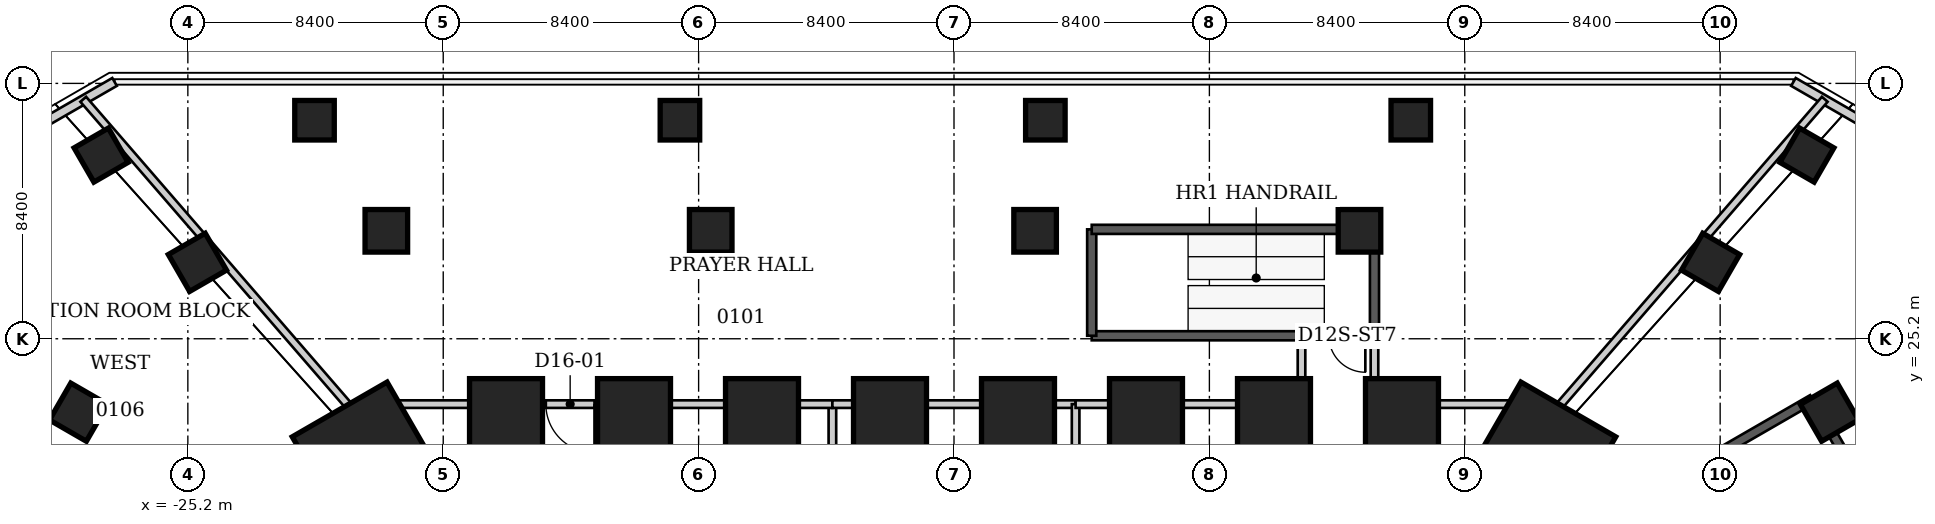
"""IFC4 building model, lengths in metres.
Left out: names, types, materials, properties, quantities, classifications, styles, units other than length and angle.
Written with IfcOpenShell. Run it as: python <this file> out.ifc"""

import sys

from ifc_helpers import new_model, si_unit, direction, frame, frame_2d, origin, origin_2d, place, context, subcontext, project, spatial, rectangle, extrude, element, fill, save


model = new_model("IFC4")
c1 = context("Model", 3, precision=1e-05, world=origin(), true_north=direction((0.0, 1.0)))
c2 = subcontext(c1, "Body", "Model", "MODEL_VIEW")
j1 = project(units=[si_unit("LENGTHUNIT", "METRE"), si_unit("PLANEANGLEUNIT", "RADIAN")], contexts=[c1])
p1 = place(None, origin())
s1 = spatial("IfcSite", under=j1, at=p1, CompositionType="ELEMENT")
p2 = place(p1, origin())
s2 = spatial("IfcBuilding", under=s1, at=p2, CompositionType="ELEMENT")
p3 = place(p2, frame((0.0, 0.0, 6.0)))
s3 = spatial("IfcBuildingStorey", under=s2, at=p3, CompositionType="ELEMENT", Elevation=6.0)
for number, where, z_axis, x_axis in (
    (1, (-14.735, 22.689, 0.0), (0.0, 0.0, 1.0), (0.0, 1.0, 0.0)),
    (2, (-10.525, 22.689, 0.0), (0.0, 0.0, 1.0), (0.0, 1.0, 0.0)),
    (3, (-6.315, 22.689, 0.0), (0.0, 0.0, 1.0), (0.0, 1.0, 0.0)),
    (4, (-2.105, 22.689, 0.0), (0.0, 0.0, 1.0), (0.0, 1.0, 0.0)),
    (5, (2.105, 22.689, 0.0), (0.0, 0.0, 1.0), (0.0, 1.0, 0.0)),
    (6, (6.315, 22.689, 0.0), (0.0, 0.0, 1.0), (0.0, 1.0, 0.0)),
    (7, (10.525, 22.689, 0.0), (0.0, 0.0, 1.0), (0.0, 1.0, 0.0)),
    (8, (14.735, 22.689, 0.0), (0.0, 0.0, 1.0), (0.0, 1.0, 0.0)),
):
    element("IfcColumn", number, at=place(p3, frame(where, z_axis=z_axis, x_axis=x_axis)), inside=s3, PredefinedType="COLUMN", context=c2, shape_type="SweptSolid", body=[
        extrude(rectangle(XDim=2.4, YDim=2.4, at=origin_2d()), origin(), (0.0, 0.0, 1.0), 6.0),
    ])
for number, where, z_axis, x_axis in (
    (9, (19.606, 21.835, 0.0), (0.0, 0.0, 1.0), (0.5, 0.866, 0.0)),
    (10, (-19.606, 21.835, 0.0), (0.0, 0.0, 1.0), (-0.5, 0.866, 0.0)),
):
    element("IfcColumn", number, at=place(p3, frame(where, z_axis=z_axis, x_axis=x_axis)), inside=s3, PredefinedType="COLUMN", context=c2, shape_type="SweptSolid", body=[
        extrude(rectangle(XDim=2.4, YDim=3.6, at=origin_2d()), origin(), (0.0, 0.0, 1.0), 6.0),
    ])
for number, where, z_axis, x_axis in (
    (11, (-18.672, 28.751, 0.0), (0.0, 0.0, 1.0), (0.0, 1.0, 0.0)),
    (12, (-8.002, 28.751, 0.0), (0.0, 0.0, 1.0), (0.0, 1.0, 0.0)),
    (13, (2.667, 28.751, 0.0), (0.0, 0.0, 1.0), (0.0, 1.0, 0.0)),
    (14, (13.337, 28.751, 0.0), (0.0, 0.0, 1.0), (0.0, 1.0, 0.0)),
    (15, (24.885, 27.714, 0.0), (0.0, 0.0, 1.0), (0.5, 0.866, 0.0)),
    (16, (28.794, 22.785, 0.0), (0.0, 0.0, 1.0), (0.866, 0.5, 0.0)),
    (17, (-28.794, 22.785, 0.0), (0.0, 0.0, 1.0), (-0.866, 0.5, 0.0)),
    (18, (-24.885, 27.714, 0.0), (0.0, 0.0, 1.0), (-0.5, 0.866, 0.0)),
):
    element("IfcColumn", number, at=place(p3, frame(where, z_axis=z_axis, x_axis=x_axis)), inside=s3, PredefinedType="COLUMN", context=c2, shape_type="SweptSolid", body=[
        extrude(rectangle(XDim=1.4, YDim=1.4, at=origin_2d()), origin(), (0.0, 0.0, 1.0), 6.0),
    ])
for number, where, z_axis, x_axis in (
    (19, (-21.034, 32.388, 0.0), (0.0, 0.0, 1.0), (0.0, 1.0, 0.0)),
    (20, (-9.014, 32.388, 0.0), (0.0, 0.0, 1.0), (0.0, 1.0, 0.0)),
    (21, (3.005, 32.388, 0.0), (0.0, 0.0, 1.0), (0.0, 1.0, 0.0)),
    (22, (15.024, 32.388, 0.0), (0.0, 0.0, 1.0), (0.0, 1.0, 0.0)),
    (23, (28.052, 31.241, 0.0), (0.0, 0.0, 1.0), (0.5, 0.866, 0.0)),
    (24, (-28.052, 31.241, 0.0), (0.0, 0.0, 1.0), (-0.5, 0.866, 0.0)),
):
    element("IfcColumn", number, at=place(p3, frame(where, z_axis=z_axis, x_axis=x_axis)), inside=s3, PredefinedType="COLUMN", context=c2, shape_type="SweptSolid", body=[
        extrude(rectangle(XDim=1.3, YDim=1.3, at=origin_2d()), origin(), (0.0, 0.0, 1.0), 6.0),
    ])
for number, where, z_axis, x_axis in (
    (25, (27.61, 33.648, 0.0), (0.0, 0.0, 1.0), (0.866, -0.5, 0.0)),
    (26, (-30.035, 32.248, 0.0), (0.0, 0.0, 1.0), (0.866, 0.5, 0.0)),
):
    element("IfcWall", number, at=place(p3, frame(where, z_axis=z_axis, x_axis=x_axis)), inside=s3, PredefinedType="SOLIDWALL", context=c2, shape_type="SweptSolid", body=[
        extrude(rectangle(XDim=2.8, YDim=0.3, at=frame_2d((1.4, 0.0))), origin(), (0.0, 0.0, 1.0), 5.84),
    ])
p4 = place(p3, frame((-20.88, 22.05, 0.0), z_axis=(0.0, 0.0, 1.0), x_axis=(-0.50097690648, -0.86546065143, 0.0)))
e27 = element("IfcWall", 27, at=p4, inside=s3, PredefinedType="PARTITIONING", context=c2, shape_type="SweptSolid", body=[
    extrude(rectangle(XDim=5.35, YDim=0.25, at=frame_2d((2.675, 0.0))), origin(), (0.0, 0.0, 1.0), 4.04),
])
p5 = place(p3, frame((-20.23, 22.43, 0.0), z_axis=(0.0, 0.0, 1.0), x_axis=(-0.863331575042, -0.504637088942, 0.0)))
e28 = element("IfcWall", 28, at=p5, inside=s3, PredefinedType="PARTITIONING", context=c2, shape_type="SweptSolid", body=[
    extrude(rectangle(XDim=0.753, YDim=0.25, at=frame_2d((0.376, 0.0))), origin(), (0.0, 0.0, 1.0), 5.84),
])
p6 = place(p3, frame((-19.746, 22.708, 0.0), z_axis=(0.0, 0.0, 1.0), x_axis=(-0.867257505244, -0.49785983931, 0.0)))
e29 = element("IfcWall", 29, at=p6, inside=s3, PredefinedType="PARTITIONING", context=c2, shape_type="SweptSolid", body=[
    extrude(rectangle(XDim=0.443, YDim=0.25, at=frame_2d((0.221, 0.0))), origin(), (0.0, 0.0, 1.0), 5.84),
])
p7 = place(p3, frame((-19.69, 22.74, 0.0), z_axis=(0.0, 0.0, 1.0), x_axis=(-0.654569518712, 0.756001815589, 0.0)))
e30 = element("IfcWall", 30, at=p7, inside=s3, PredefinedType="PARTITIONING", context=c2, shape_type="SweptSolid", body=[
    extrude(rectangle(XDim=13.674, YDim=0.25, at=frame_2d((6.837, 0.0))), origin(), (0.0, 0.0, 1.0), 5.75),
])
p8 = place(p3, frame((-19.15, 23.05, 0.0), z_axis=(0.0, 0.0, 1.0), x_axis=(-0.867193315, -0.497971640175, 0.0)))
e31 = element("IfcWall", 31, at=p8, inside=s3, PredefinedType="PARTITIONING", context=c2, shape_type="SweptSolid", body=[
    extrude(rectangle(XDim=0.588, YDim=0.25, at=frame_2d((0.294, 0.0))), origin(), (0.0, 0.0, 1.0), 5.84),
])
p9 = place(p3, frame((-17.14, 20.65, 0.0), z_axis=(0.0, 0.0, 1.0), x_axis=(-0.866514787199, 0.49915140345, 0.0)))
e32 = element("IfcWall", 32, at=p9, inside=s3, PredefinedType="PARTITIONING", context=c2, shape_type="SweptSolid", body=[
    extrude(rectangle(XDim=3.566, YDim=0.25, at=frame_2d((1.783, 0.0))), origin(), (0.0, 0.0, 1.0), 5.84),
])
p10 = place(p3, frame((-4.0, 10.04, 0.0), z_axis=(0.0, 0.0, 1.0), x_axis=(0.0, 1.0, 0.0)))
e33 = element("IfcWall", 33, at=p10, inside=s3, PredefinedType="PARTITIONING", context=c2, shape_type="SweptSolid", body=[
    extrude(rectangle(XDim=13.01, YDim=0.25, at=frame_2d((6.505, 0.0))), origin(), (0.0, 0.0, 1.0), 5.84),
])
p11 = place(p3, frame((-4.0, 23.05, 0.0), z_axis=(0.0, 0.0, 1.0), x_axis=(-1.0, 0.0, 0.0)))
e34 = element("IfcWall", 34, at=p11, inside=s3, PredefinedType="PARTITIONING", context=c2, shape_type="SweptSolid", body=[
    extrude(rectangle(XDim=15.15, YDim=0.25, at=frame_2d((7.575, 0.0))), origin(), (0.0, 0.0, 1.0), 4.04),
])
p12 = place(p11, frame((7.825, 0.0, 0.0)))
e35 = element("IfcOpeningElement", 35, at=p12, cuts=e34, PredefinedType="OPENING", context=c2, shape_type="SweptSolid", body=[
    extrude(rectangle(XDim=1.6, YDim=2.4, at=frame_2d((0.8, 1.2))), frame((0.0, 0.125, 0.0), z_axis=(0.0, -1.0, 0.0), x_axis=(1.0, 0.0, 0.0)), (0.0, 0.0, 1.0), 0.25),
])
p13 = place(p3, frame((4.0, 23.05, 0.0), z_axis=(0.0, 0.0, 1.0), x_axis=(-1.0, 0.0, 0.0)))
e36 = element("IfcWall", 36, at=p13, inside=s3, PredefinedType="PARTITIONING", context=c2, shape_type="SweptSolid", body=[
    extrude(rectangle(XDim=8.0, YDim=0.25, at=frame_2d((4.0, 0.0))), origin(), (0.0, 0.0, 1.0), 4.04),
])
p14 = place(p3, frame((4.0, 23.05, 0.0), z_axis=(0.0, 0.0, 1.0), x_axis=(0.0, -1.0, 0.0)))
e37 = element("IfcWall", 37, at=p14, inside=s3, PredefinedType="PARTITIONING", context=c2, shape_type="SweptSolid", body=[
    extrude(rectangle(XDim=13.03, YDim=0.25, at=frame_2d((6.515, 0.0))), origin(), (0.0, 0.0, 1.0), 5.84),
])
p15 = place(p14, frame((5.965, 0.0, 0.0)))
e38 = element("IfcOpeningElement", 38, at=p15, cuts=e37, PredefinedType="OPENING", context=c2, shape_type="SweptSolid", body=[
    extrude(rectangle(XDim=1.1, YDim=2.2, at=frame_2d((0.55, 1.1))), frame((0.0, 0.125, 0.0), z_axis=(0.0, -1.0, 0.0), x_axis=(1.0, 0.0, 0.0)), (0.0, 0.0, 1.0), 0.25),
])
p16 = place(p3, frame((5.43, 23.05, 0.0), z_axis=(0.0, 0.0, 1.0), x_axis=(-1.0, 0.0, 0.0)))
e39 = element("IfcWall", 39, at=p16, inside=s3, PredefinedType="PARTITIONING", context=c2, shape_type="SweptSolid", body=[
    extrude(rectangle(XDim=1.43, YDim=0.25, at=frame_2d((0.715, 0.0))), origin(), (0.0, 0.0, 1.0), 4.04),
])
p17 = place(p3, frame((5.43, 23.05, 0.0), z_axis=(0.0, 0.0, 1.0), x_axis=(0.0, -1.0, 0.0)))
e40 = element("IfcWall", 40, at=p17, inside=s3, PredefinedType="PARTITIONING", context=c2, shape_type="SweptSolid", body=[
    extrude(rectangle(XDim=2.4, YDim=0.25, at=frame_2d((1.2, 0.0))), origin(), (0.0, 0.0, 1.0), 5.84),
])
p18 = place(p3, frame((11.43, 23.05, 0.0), z_axis=(0.0, 0.0, 1.0), x_axis=(-1.0, 0.0, 0.0)))
e41 = element("IfcWall", 41, at=p18, inside=s3, PredefinedType="PARTITIONING", context=c2, shape_type="SweptSolid", body=[
    extrude(rectangle(XDim=6.0, YDim=0.25, at=frame_2d((3.0, 0.0))), origin(), (0.0, 0.0, 1.0), 4.04),
])
for number, where, z_axis, x_axis in (
    (42, (11.43, 25.2, 0.0), (0.0, 0.0, 1.0), (0.0, -1.0, 0.0)),
    (43, (13.83, 23.05, 0.0), (0.0, 0.0, 1.0), (0.0, 1.0, 0.0)),
):
    element("IfcWall", number, at=place(p3, frame(where, z_axis=z_axis, x_axis=x_axis)), inside=s3, PredefinedType="PARTITIONING", context=c2, shape_type="SweptSolid", body=[
        extrude(rectangle(XDim=2.15, YDim=0.25, at=frame_2d((1.075, 0.0))), origin(), (0.0, 0.0, 1.0), 5.84),
    ])
p19 = place(p3, frame((19.15, 23.05, 0.0), z_axis=(0.0, 0.0, 1.0), x_axis=(-1.0, 0.0, 0.0)))
e44 = element("IfcWall", 44, at=p19, inside=s3, PredefinedType="PARTITIONING", context=c2, shape_type="SweptSolid", body=[
    extrude(rectangle(XDim=5.32, YDim=0.25, at=frame_2d((2.66, 0.0))), origin(), (0.0, 0.0, 1.0), 4.04),
])
p20 = place(p3, frame((19.15, 23.05, 0.0), z_axis=(0.0, 0.0, 1.0), x_axis=(0.866627900645, -0.498954989777, 0.0)))
e45 = element("IfcWall", 45, at=p20, inside=s3, PredefinedType="PARTITIONING", context=c2, shape_type="SweptSolid", body=[
    extrude(rectangle(XDim=0.588, YDim=0.25, at=frame_2d((0.294, 0.0))), origin(), (0.0, 0.0, 1.0), 5.84),
])
p21 = place(p3, frame((19.733, 22.715, 0.0), z_axis=(0.0, 0.0, 1.0), x_axis=(0.866550582058, -0.499089259287, 0.0)))
e46 = element("IfcWall", 46, at=p21, inside=s3, PredefinedType="PARTITIONING", context=c2, shape_type="SweptSolid", body=[
    extrude(rectangle(XDim=0.089, YDim=0.25, at=frame_2d((0.044, 0.0))), origin(), (0.0, 0.0, 1.0), 5.84),
])
p22 = place(p3, frame((19.83, 19.08, 0.0), z_axis=(0.0, 0.0, 1.0), x_axis=(-0.005576247883, 0.999984452609, 0.0)))
e47 = element("IfcWall", 47, at=p22, inside=s3, PredefinedType="PARTITIONING", context=c2, shape_type="SweptSolid", body=[
    extrude(rectangle(XDim=3.59, YDim=0.25, at=frame_2d((1.795, 0.0))), origin(), (0.0, 0.0, 1.0), 5.84),
])
p23 = place(p3, frame((20.88, 22.05, 0.0), z_axis=(0.0, 0.0, 1.0), x_axis=(-0.865250488556, 0.501339796998, 0.0)))
e48 = element("IfcWall", 48, at=p23, inside=s3, PredefinedType="PARTITIONING", context=c2, shape_type="SweptSolid", body=[
    extrude(rectangle(XDim=1.236, YDim=0.25, at=frame_2d((0.618, 0.0))), origin(), (0.0, 0.0, 1.0), 5.84),
])
p24 = place(p3, frame((22.67, 18.96, 0.0), z_axis=(0.0, 0.0, 1.0), x_axis=(-0.501254541389, 0.865299881392, 0.0)))
e49 = element("IfcWall", 49, at=p24, inside=s3, PredefinedType="PARTITIONING", context=c2, shape_type="SweptSolid", body=[
    extrude(rectangle(XDim=3.571, YDim=0.25, at=frame_2d((1.786, 0.0))), origin(), (0.0, 0.0, 1.0), 5.84),
])
p25 = place(p3, frame((28.64, 33.077, 0.0), z_axis=(0.0, 0.0, 1.0), x_axis=(-0.654569518712, -0.756001815589, 0.0)))
e50 = element("IfcWall", 50, at=p25, inside=s3, PredefinedType="PARTITIONING", context=c2, shape_type="SweptSolid", body=[
    extrude(rectangle(XDim=13.674, YDim=0.25, at=frame_2d((6.837, 0.0))), origin(), (0.0, 0.0, 1.0), 5.75),
])
p26 = place(p3, frame((24.165, 20.867, 0.0), z_axis=(0.0, 0.0, 1.0), x_axis=(0.866016039709, 0.500016218704, 0.0)))
e51 = element("IfcWall", 51, at=p26, inside=s3, PredefinedType="SHEAR", context=c2, shape_type="SweptSolid", body=[
    extrude(rectangle(XDim=4.7, YDim=0.3, at=frame_2d((2.35, 0.0))), origin(), (0.0, 0.0, 1.0), 6.0),
])
p27 = place(p3, frame((28.235, 23.217, 0.0), z_axis=(0.0, 0.0, 1.0), x_axis=(0.500004225487, -0.866022964185, 0.0)))
e52 = element("IfcWall", 52, at=p27, inside=s3, PredefinedType="SHEAR", context=c2, shape_type="SweptSolid", body=[
    extrude(rectangle(XDim=9.3, YDim=0.3, at=frame_2d((4.65, 0.0))), origin(), (0.0, 0.0, 1.0), 6.0),
])
p28 = place(p3, frame((13.83, 25.299, 0.0), z_axis=(0.0, 0.0, 1.0), x_axis=(-1.0, 0.0, 0.0)))
e53 = element("IfcWall", 53, at=p28, inside=s3, PredefinedType="SHEAR", context=c2, shape_type="SweptSolid", body=[
    extrude(rectangle(XDim=9.3, YDim=0.3, at=frame_2d((4.65, 0.0))), origin(), (0.0, 0.0, 1.0), 6.0),
])
p29 = place(p28, frame((0.3, 0.0, 0.0)))
e54 = element("IfcOpeningElement", 54, at=p29, cuts=e53, PredefinedType="OPENING", context=c2, shape_type="SweptSolid", body=[
    extrude(rectangle(XDim=1.2, YDim=2.4, at=frame_2d((0.6, 1.2))), frame((0.0, 0.15, 0.0), z_axis=(0.0, -1.0, 0.0), x_axis=(1.0, 0.0, 0.0)), (0.0, 0.0, 1.0), 0.3),
])
p30 = place(p3, frame((4.53, 25.299, 0.0), z_axis=(0.0, 0.0, 1.0), x_axis=(0.0, 1.0, 0.0)))
e55 = element("IfcWall", 55, at=p30, inside=s3, PredefinedType="SHEAR", context=c2, shape_type="SweptSolid", body=[
    extrude(rectangle(XDim=3.5, YDim=0.3, at=frame_2d((1.75, 0.0))), origin(), (0.0, 0.0, 1.0), 6.0),
])
p31 = place(p3, frame((4.53, 28.799, 0.0), z_axis=(0.0, 0.0, 1.0), x_axis=(1.0, 0.0, 0.0)))
e56 = element("IfcWall", 56, at=p31, inside=s3, PredefinedType="SHEAR", context=c2, shape_type="SweptSolid", body=[
    extrude(rectangle(XDim=9.3, YDim=0.3, at=frame_2d((4.65, 0.0))), origin(), (0.0, 0.0, 1.0), 6.0),
])
p32 = place(p3, frame((13.83, 28.799, 0.0), z_axis=(0.0, 0.0, 1.0), x_axis=(0.0, -1.0, 0.0)))
e57 = element("IfcWall", 57, at=p32, inside=s3, PredefinedType="SHEAR", context=c2, shape_type="SweptSolid", body=[
    extrude(rectangle(XDim=3.5, YDim=0.3, at=frame_2d((1.75, 0.0))), origin(), (0.0, 0.0, 1.0), 6.0),
])
p33 = place(p12, origin())
e58 = element("IfcDoor", 58, at=p33, inside=s3, OperationType="DOUBLE_DOOR_SINGLE_SWING", PredefinedType="DOOR", context=c2, shape_type="SweptSolid", body=[
    extrude(rectangle(XDim=1.6, YDim=2.4, at=frame_2d((0.8, 1.2))), frame((0.0, 0.025, 0.0), z_axis=(0.0, -1.0, 0.0), x_axis=(1.0, 0.0, 0.0)), (0.0, 0.0, 1.0), 0.05),
])
fill(e35, e58)
p34 = place(p29, origin())
e59 = element("IfcDoor", 59, at=p34, inside=s3, OperationType="SINGLE_SWING_LEFT", PredefinedType="DOOR", context=c2, shape_type="SweptSolid", body=[
    extrude(rectangle(XDim=1.2, YDim=2.4, at=frame_2d((0.6, 1.2))), frame((0.0, 0.025, 0.0), z_axis=(0.0, -1.0, 0.0), x_axis=(1.0, 0.0, 0.0)), (0.0, 0.0, 1.0), 0.05),
])
fill(e54, e59)
save(model, sys.argv[1])
